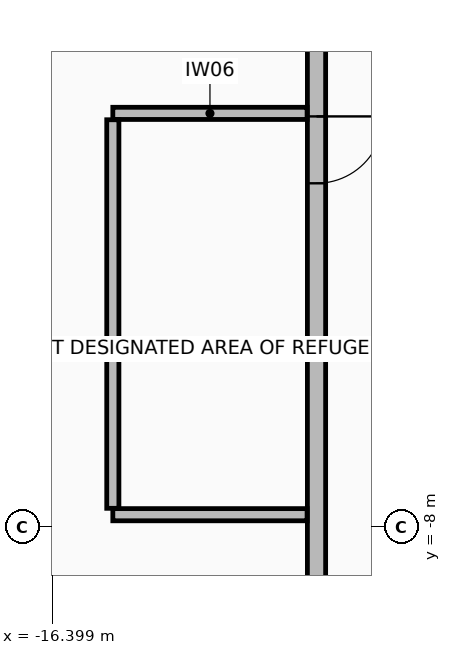
"""IFC4 building model, lengths in metres.
Left out: names, types, materials, properties, quantities, classifications, styles, units other than length and angle.
Written with IfcOpenShell. Run it as: python <this file> out.ifc"""

import sys

from ifc_helpers import new_model, si_unit, direction, frame, frame_2d, origin, place, context, subcontext, project, spatial, rectangle, extrude, element, fill, save


model = new_model("IFC4")
c1 = context("Model", 3, precision=1e-05, world=origin(), true_north=direction((0.0, 1.0)))
c2 = subcontext(c1, "Body", "Model", "MODEL_VIEW")
j1 = project(units=[si_unit("LENGTHUNIT", "METRE"), si_unit("PLANEANGLEUNIT", "RADIAN")], contexts=[c1])
p1 = place(None, origin())
s1 = spatial("IfcSite", under=j1, at=p1, CompositionType="ELEMENT")
p2 = place(p1, origin())
s2 = spatial("IfcBuilding", under=s1, at=p2, CompositionType="ELEMENT")
p3 = place(p2, frame((0.0, 0.0, 222.05)))
s3 = spatial("IfcBuildingStorey", under=s2, at=p3, CompositionType="ELEMENT", Elevation=222.05)
p4 = place(p3, frame((-12.05, 10.75, 0.0), z_axis=(0.0, 0.0, 1.0), x_axis=(0.0, -1.0, 0.0)))
e1 = element("IfcWall", 1, at=p4, inside=s3, PredefinedType="STANDARD", context=c2, shape_type="SweptSolid", body=[
    extrude(rectangle(XDim=21.5, YDim=0.3, at=frame_2d((10.75, 0.0))), origin(), (0.0, 0.0, 1.0), 2.605),
])
p5 = place(p4, frame((12.0, 0.0, 0.0)))
e2 = element("IfcOpeningElement", 2, at=p5, cuts=e1, PredefinedType="OPENING", context=c2, shape_type="SweptSolid", body=[
    extrude(rectangle(XDim=1.1, YDim=2.15, at=frame_2d((0.55, 1.075))), frame((0.0, 0.16, 0.0), z_axis=(0.0, -1.0, 0.0), x_axis=(1.0, 0.0, 0.0)), (0.0, 0.0, 1.0), 0.32),
])
for number, where, z_axis, x_axis in (
    (3, (-15.4, -1.2, 0.0), (0.0, 0.0, 1.0), (1.0, 0.0, 0.0)),
    (4, (-12.205, -7.8, 0.0), (0.0, 0.0, 1.0), (-1.0, 0.0, 0.0)),
):
    element("IfcWall", number, at=place(p3, frame(where, z_axis=z_axis, x_axis=x_axis)), inside=s3, PredefinedType="PARTITIONING", context=c2, shape_type="SweptSolid", body=[
        extrude(rectangle(XDim=3.195, YDim=0.2, at=frame_2d((1.597, 0.0))), origin(), (0.0, 0.0, 1.0), 4.505),
    ])
p6 = place(p3, frame((-15.4, -7.695, 0.0), z_axis=(0.0, 0.0, 1.0), x_axis=(0.0, 1.0, 0.0)))
e5 = element("IfcWall", 5, at=p6, inside=s3, PredefinedType="PARTITIONING", context=c2, shape_type="SweptSolid", body=[
    extrude(rectangle(XDim=6.39, YDim=0.2, at=frame_2d((3.195, 0.0))), origin(), (0.0, 0.0, 1.0), 3.005),
])
p7 = place(p5, origin())
e6 = element("IfcDoor", 6, at=p7, inside=s3, OperationType="SINGLE_SWING_LEFT", PredefinedType="DOOR", context=c2, shape_type="SweptSolid", body=[
    extrude(rectangle(XDim=1.1, YDim=2.15, at=frame_2d((0.55, 1.075))), frame((0.0, 0.025, 0.0), z_axis=(0.0, -1.0, 0.0), x_axis=(1.0, 0.0, 0.0)), (0.0, 0.0, 1.0), 0.05),
])
fill(e2, e6)
save(model, sys.argv[1])
